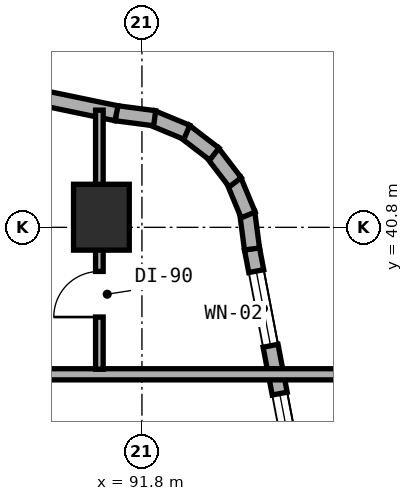
"""IFC4 building model, lengths in metres.
Left out: names, types, materials, properties, quantities, classifications, styles, units other than length and angle.
Written with IfcOpenShell. Run it as: python <this file> out.ifc"""

import sys

from ifc_helpers import new_model, si_unit, direction, frame, frame_2d, origin, origin_2d, place, context, subcontext, project, spatial, rectangle, extrude, element, fill, save


model = new_model("IFC4")
c1 = context("Model", 3, precision=1e-05, world=origin(), true_north=direction((0.0, 1.0)))
c2 = subcontext(c1, "Body", "Model", "MODEL_VIEW")
j1 = project(units=[si_unit("LENGTHUNIT", "METRE"), si_unit("PLANEANGLEUNIT", "RADIAN")], contexts=[c1])
p1 = place(None, origin())
s1 = spatial("IfcSite", under=j1, at=p1, CompositionType="ELEMENT")
p2 = place(p1, origin())
s2 = spatial("IfcBuilding", under=s1, at=p2, CompositionType="ELEMENT")
p3 = place(p2, frame((0.0, 0.0, 52.0)))
s3 = spatial("IfcBuildingStorey", under=s2, at=p3, CompositionType="ELEMENT", Elevation=52.0)
p4 = place(p3, frame((91.0, 41.0, 0.0), z_axis=(0.0, 0.0, 1.0), x_axis=(1.0, 0.0, 0.0)))
e1 = element("IfcColumn", 1, at=p4, inside=s3, PredefinedType="COLUMN", context=c2, shape_type="SweptSolid", body=[
    extrude(rectangle(XDim=1.1, YDim=1.3, at=origin_2d()), origin(), (0.0, 0.0, 1.0), 3.5),
])
p5 = place(p3, frame((95.783, 30.918, 0.0), z_axis=(0.0, 0.0, 1.0), x_axis=(-0.188087874316, 0.982152203854, 0.0)))
e2 = element("IfcWall", 2, at=p5, inside=s3, PredefinedType="STANDARD", context=c2, shape_type="SweptSolid", body=[
    extrude(rectangle(XDim=9.634, YDim=0.3, at=frame_2d((4.817, 0.0))), origin(), (0.0, 0.0, 1.0), 3.25),
])
p6 = place(p5, frame((1.999, 0.0, 0.8)))
e3 = element("IfcOpeningElement", 3, at=p6, cuts=e2, PredefinedType="OPENING", context=c2, shape_type="SweptSolid", body=[
    extrude(rectangle(XDim=2.4, YDim=1.6, at=frame_2d((1.2, 0.8))), frame((0.0, 0.16, 0.0), z_axis=(0.0, -1.0, 0.0), x_axis=(1.0, 0.0, 0.0)), (0.0, 0.0, 1.0), 0.32),
])
p7 = place(p5, frame((5.521, 0.0, 0.85)))
e4 = element("IfcOpeningElement", 4, at=p7, cuts=e2, PredefinedType="OPENING", context=c2, shape_type="SweptSolid", body=[
    extrude(rectangle(XDim=1.2, YDim=1.5, at=frame_2d((0.6, 0.75))), frame((0.0, 0.16, 0.0), z_axis=(0.0, -1.0, 0.0), x_axis=(1.0, 0.0, 0.0)), (0.0, 0.0, 1.0), 0.32),
])
p8 = place(p5, frame((7.682, 0.0, 0.85)))
e5 = element("IfcOpeningElement", 5, at=p8, cuts=e2, PredefinedType="OPENING", context=c2, shape_type="SweptSolid", body=[
    extrude(rectangle(XDim=1.5, YDim=1.5, at=frame_2d((0.75, 0.75))), frame((0.0, 0.16, 0.0), z_axis=(0.0, -1.0, 0.0), x_axis=(1.0, 0.0, 0.0)), (0.0, 0.0, 1.0), 0.32),
])
p9 = place(p3, frame((93.972, 40.373, 0.0), z_axis=(0.0, 0.0, 1.0), x_axis=(-0.130255288807, 0.991480488834, 0.0)))
e6 = element("IfcWall", 6, at=p9, inside=s3, PredefinedType="STANDARD", context=c2, shape_type="SweptSolid", body=[
    extrude(rectangle(XDim=0.729, YDim=0.3, at=frame_2d((0.365, 0.0))), origin(), (0.0, 0.0, 1.0), 3.25),
])
p10 = place(p3, frame((93.896, 41.045, 0.0), z_axis=(0.0, 0.0, 1.0), x_axis=(-0.383267045233, 0.923637576129, 0.0)))
e7 = element("IfcWall", 7, at=p10, inside=s3, PredefinedType="STANDARD", context=c2, shape_type="SweptSolid", body=[
    extrude(rectangle(XDim=0.746, YDim=0.3, at=frame_2d((0.373, 0.0))), origin(), (0.0, 0.0, 1.0), 3.25),
])
for number, where, z_axis, x_axis in (
    (8, (93.641, 41.689, 0.0), (0.0, 0.0, 1.0), (-0.609, 0.793, 0.0)),
    (9, (93.229, 42.246, 0.0), (0.0, 0.0, 1.0), (-0.794, 0.608, 0.0)),
):
    element("IfcWall", number, at=place(p3, frame(where, z_axis=z_axis, x_axis=x_axis)), inside=s3, PredefinedType="STANDARD", context=c2, shape_type="SweptSolid", body=[
        extrude(rectangle(XDim=0.746, YDim=0.3, at=frame_2d((0.373, 0.0))), origin(), (0.0, 0.0, 1.0), 3.25),
    ])
p11 = place(p3, frame((92.686, 42.676, 0.0), z_axis=(0.0, 0.0, 1.0), x_axis=(-0.923637576129, 0.383267045233, 0.0)))
e10 = element("IfcWall", 10, at=p11, inside=s3, PredefinedType="STANDARD", context=c2, shape_type="SweptSolid", body=[
    extrude(rectangle(XDim=0.746, YDim=0.3, at=frame_2d((0.373, 0.0))), origin(), (0.0, 0.0, 1.0), 3.25),
])
p12 = place(p3, frame((92.051, 42.953, 0.0), z_axis=(0.0, 0.0, 1.0), x_axis=(-0.991559404866, 0.129653178221, 0.0)))
e11 = element("IfcWall", 11, at=p12, inside=s3, PredefinedType="STANDARD", context=c2, shape_type="SweptSolid", body=[
    extrude(rectangle(XDim=0.764, YDim=0.3, at=frame_2d((0.382, 0.0))), origin(), (0.0, 0.0, 1.0), 3.25),
])
p13 = place(p3, frame((91.298, 43.051, 0.0), z_axis=(0.0, 0.0, 1.0), x_axis=(-0.979128391325, 0.203242695569, 0.0)))
e12 = element("IfcWall", 12, at=p13, inside=s3, PredefinedType="STANDARD", context=c2, shape_type="SweptSolid", body=[
    extrude(rectangle(XDim=8.92, YDim=0.3, at=frame_2d((4.46, 0.0))), origin(), (0.0, 0.0, 1.0), 3.25),
])
p14 = place(p13, frame((3.472, 0.0, 0.8)))
e13 = element("IfcOpeningElement", 13, at=p14, cuts=e12, PredefinedType="OPENING", context=c2, shape_type="SweptSolid", body=[
    extrude(rectangle(XDim=2.4, YDim=1.6, at=frame_2d((1.2, 0.8))), frame((0.0, 0.16, 0.0), z_axis=(0.0, -1.0, 0.0), x_axis=(1.0, 0.0, 0.0)), (0.0, 0.0, 1.0), 0.32),
])
p15 = place(p3, frame((88.35, 37.9, 0.0), z_axis=(0.0, 0.0, 1.0), x_axis=(1.0, 0.0, 0.0)))
e14 = element("IfcWall", 14, at=p15, inside=s3, PredefinedType="SOLIDWALL", context=c2, shape_type="SweptSolid", body=[
    extrude(rectangle(XDim=7.41, YDim=0.22, at=frame_2d((3.705, 0.0))), origin(), (0.0, 0.0, 1.0), 2.865),
])
p16 = place(p3, frame((90.96, 38.0, 0.0), z_axis=(0.0, 0.0, 1.0), x_axis=(0.0, 1.0, 0.0)))
e15 = element("IfcWall", 15, at=p16, inside=s3, PredefinedType="PARTITIONING", context=c2, shape_type="SweptSolid", body=[
    extrude(rectangle(XDim=5.113, YDim=0.15, at=frame_2d((2.557, 0.0))), origin(), (0.0, 0.0, 1.0), 2.865),
])
p17 = place(p16, frame((1.03, 0.0, 0.0)))
e16 = element("IfcOpeningElement", 16, at=p17, cuts=e15, PredefinedType="OPENING", context=c2, shape_type="SweptSolid", body=[
    extrude(rectangle(XDim=0.9, YDim=2.1, at=frame_2d((0.45, 1.05))), frame((0.0, 0.085, 0.0), z_axis=(0.0, -1.0, 0.0), x_axis=(1.0, 0.0, 0.0)), (0.0, 0.0, 1.0), 0.17),
])
p18 = place(p7, origin())
e17 = element("IfcWindow", 17, at=p18, inside=s3, PartitioningType="SINGLE_PANEL", PredefinedType="WINDOW", context=c2, shape_type="SweptSolid", body=[
    extrude(rectangle(XDim=1.2, YDim=1.5, at=frame_2d((0.6, 0.75))), frame((0.0, 0.03, 0.0), z_axis=(0.0, -1.0, 0.0), x_axis=(1.0, 0.0, 0.0)), (0.0, 0.0, 1.0), 0.06),
])
fill(e4, e17)
p19 = place(p8, origin())
e18 = element("IfcWindow", 18, at=p19, inside=s3, PartitioningType="SINGLE_PANEL", PredefinedType="WINDOW", context=c2, shape_type="SweptSolid", body=[
    extrude(rectangle(XDim=1.5, YDim=1.5, at=frame_2d((0.75, 0.75))), frame((0.0, 0.03, 0.0), z_axis=(0.0, -1.0, 0.0), x_axis=(1.0, 0.0, 0.0)), (0.0, 0.0, 1.0), 0.06),
])
fill(e5, e18)
p20 = place(p17, origin())
e19 = element("IfcDoor", 19, at=p20, inside=s3, OperationType="SINGLE_SWING_LEFT", PredefinedType="DOOR", context=c2, shape_type="SweptSolid", body=[
    extrude(rectangle(XDim=0.9, YDim=2.1, at=frame_2d((0.45, 1.05))), frame((0.0, 0.025, 0.0), z_axis=(0.0, -1.0, 0.0), x_axis=(1.0, 0.0, 0.0)), (0.0, 0.0, 1.0), 0.05),
])
fill(e16, e19)
save(model, sys.argv[1])
